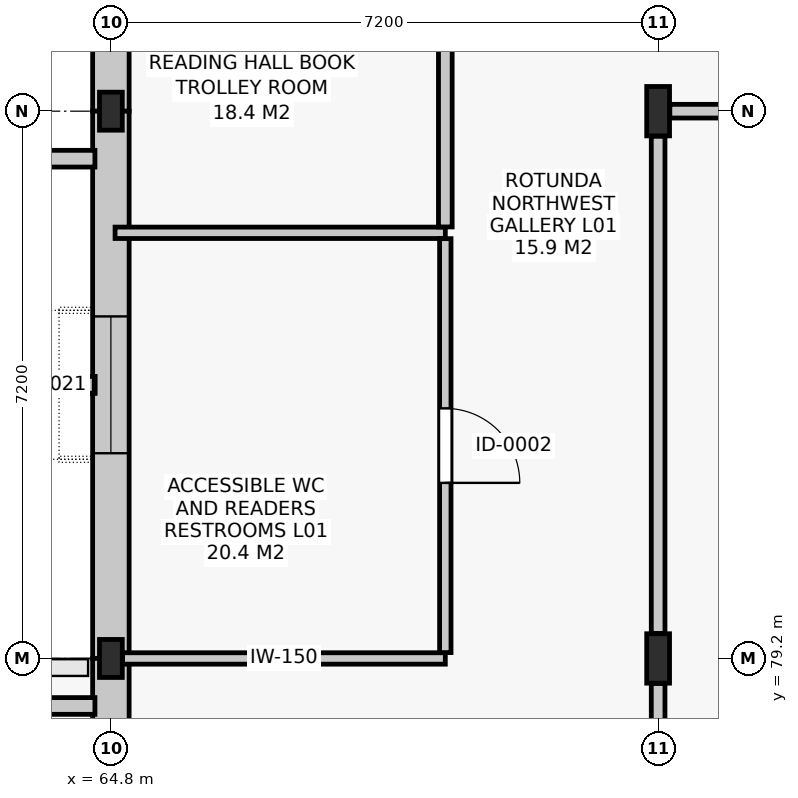
"""IFC4 building model, lengths in metres.
Left out: names, types, materials, properties, quantities, classifications, styles, units other than length and angle.
Written with IfcOpenShell. Run it as: python <this file> out.ifc"""

import sys

from ifc_helpers import new_model, si_unit, direction, frame, frame_2d, origin, origin_2d, place, context, subcontext, project, spatial, rectangle, i_section, extrude, element, fill, save


model = new_model("IFC4")
c1 = context("Model", 3, precision=1e-05, world=origin(), true_north=direction((0.0, 1.0)))
c2 = subcontext(c1, "Body", "Model", "MODEL_VIEW")
j1 = project(units=[si_unit("LENGTHUNIT", "METRE"), si_unit("PLANEANGLEUNIT", "RADIAN")], contexts=[c1])
p1 = place(None, origin())
s1 = spatial("IfcSite", under=j1, at=p1, CompositionType="ELEMENT")
p2 = place(p1, origin())
s2 = spatial("IfcBuilding", under=s1, at=p2, CompositionType="ELEMENT")
p3 = place(p2, frame((0.0, 0.0, 5.4)))
s3 = spatial("IfcBuildingStorey", under=s2, at=p3, CompositionType="ELEMENT", Elevation=5.4)
for number, where, z_axis, x_axis in (
    (1, (64.8, 79.2, 0.0), (0.0, 0.0, 1.0), (1.0, 0.0, 0.0)),
    (2, (64.8, 86.4, 0.0), (0.0, 0.0, 1.0), (1.0, 0.0, 0.0)),
):
    element("IfcColumn", number, at=place(p3, frame(where, z_axis=z_axis, x_axis=x_axis)), inside=s3, PredefinedType="COLUMN", context=c2, shape_type="SweptSolid", body=[
        extrude(i_section(OverallWidth=0.3, OverallDepth=0.5, WebThickness=0.014, FlangeThickness=0.028, FilletRadius=0.027, at=origin_2d()), origin(), (0.0, 0.0, 1.0), 4.8),
    ])
for number, where, z_axis, x_axis in (
    (3, (72.0, 79.2, 0.0), (0.0, 0.0, 1.0), (1.0, 0.0, 0.0)),
    (4, (72.0, 86.4, 0.0), (0.0, 0.0, 1.0), (1.0, 0.0, 0.0)),
):
    element("IfcColumn", number, at=place(p3, frame(where, z_axis=z_axis, x_axis=x_axis)), inside=s3, PredefinedType="COLUMN", context=c2, shape_type="SweptSolid", body=[
        extrude(i_section(OverallWidth=0.3, OverallDepth=0.65, WebThickness=0.016, FlangeThickness=0.031, FilletRadius=0.027, at=origin_2d()), origin(), (0.0, 0.0, 1.0), 4.8),
    ])
p4 = place(p3, frame((64.8, 93.346, 0.0), z_axis=(0.0, 0.0, 1.0), x_axis=(0.0, -1.0, 0.0)))
e5 = element("IfcWall", 5, at=p4, inside=s3, PredefinedType="SOLIDWALL", context=c2, shape_type="SweptSolid", body=[
    extrude(rectangle(XDim=6.946, YDim=0.48, at=frame_2d((3.473, 0.0))), origin(), (0.0, 0.0, 1.0), 3.8),
])
p5 = place(p3, frame((64.8, 86.4, 0.0), z_axis=(0.0, 0.0, 1.0), x_axis=(0.0, -1.0, 0.0)))
e6 = element("IfcWall", 6, at=p5, inside=s3, PredefinedType="SOLIDWALL", context=c2, shape_type="SweptSolid", body=[
    extrude(rectangle(XDim=7.2, YDim=0.48, at=frame_2d((3.6, 0.0))), origin(), (0.0, 0.0, 1.0), 3.8),
])
p6 = place(p5, frame((2.7, 0.0, 0.9)))
e7 = element("IfcOpeningElement", 7, at=p6, cuts=e6, PredefinedType="OPENING", context=c2, shape_type="SweptSolid", body=[
    extrude(rectangle(XDim=1.8, YDim=2.45, at=frame_2d((0.9, 1.225))), frame((0.0, 0.252, 0.0), z_axis=(0.0, -1.0, 0.0), x_axis=(1.0, 0.0, 0.0)), (0.0, 0.0, 1.0), 0.504),
])
p7 = place(p3, frame((64.8, 79.2, 0.0), z_axis=(0.0, 0.0, 1.0), x_axis=(0.0, -1.0, 0.0)))
e8 = element("IfcWall", 8, at=p7, inside=s3, PredefinedType="SOLIDWALL", context=c2, shape_type="SweptSolid", body=[
    extrude(rectangle(XDim=7.2, YDim=0.48, at=frame_2d((3.6, 0.0))), origin(), (0.0, 0.0, 1.0), 3.8),
])
p8 = place(p7, frame((2.7, 0.0, 0.0)))
e9 = element("IfcOpeningElement", 9, at=p8, cuts=e8, PredefinedType="OPENING", context=c2, shape_type="SweptSolid", body=[
    extrude(rectangle(XDim=1.8, YDim=2.3, at=frame_2d((0.9, 1.15))), frame((0.0, 0.252, 0.0), z_axis=(0.0, -1.0, 0.0), x_axis=(1.0, 0.0, 0.0)), (0.0, 0.0, 1.0), 0.504),
])
p9 = place(p3, frame((64.954, 79.2, 0.0), z_axis=(0.0, 0.0, 1.0), x_axis=(1.0, 0.0, 0.0)))
e10 = element("IfcWall", 10, at=p9, inside=s3, PredefinedType="PARTITIONING", context=c2, shape_type="SweptSolid", body=[
    extrude(rectangle(XDim=4.246, YDim=0.15, at=frame_2d((2.123, 0.0))), origin(), (0.0, 0.0, 1.0), 4.055),
])
p10 = place(p3, frame((64.855, 84.8, 0.0), z_axis=(0.0, 0.0, 1.0), x_axis=(1.0, 0.0, 0.0)))
e11 = element("IfcWall", 11, at=p10, inside=s3, PredefinedType="PARTITIONING", context=c2, shape_type="SweptSolid", body=[
    extrude(rectangle(XDim=4.345, YDim=0.15, at=frame_2d((2.172, 0.0))), origin(), (0.0, 0.0, 1.0), 3.955),
])
p11 = place(p3, frame((72.154, 86.4, 0.0), z_axis=(0.0, 0.0, 1.0), x_axis=(1.0, 0.0, 0.0)))
e12 = element("IfcWall", 12, at=p11, inside=s3, PredefinedType="PARTITIONING", context=c2, shape_type="SweptSolid", body=[
    extrude(rectangle(XDim=6.892, YDim=0.18, at=frame_2d((3.446, 0.0))), origin(), (0.0, 0.0, 1.0), 4.505),
])
p12 = place(p11, frame((2.546, 0.0, 0.0)))
e13 = element("IfcOpeningElement", 13, at=p12, cuts=e12, PredefinedType="OPENING", context=c2, shape_type="SweptSolid", body=[
    extrude(rectangle(XDim=1.8, YDim=2.35, at=frame_2d((0.9, 1.175))), frame((0.0, 0.102, 0.0), z_axis=(0.0, -1.0, 0.0), x_axis=(1.0, 0.0, 0.0)), (0.0, 0.0, 1.0), 0.204),
])
p13 = place(p3, frame((69.2, 79.277, 0.0), z_axis=(0.0, 0.0, 1.0), x_axis=(0.0, 1.0, 0.0)))
e14 = element("IfcWall", 14, at=p13, inside=s3, PredefinedType="PARTITIONING", context=c2, shape_type="SweptSolid", body=[
    extrude(rectangle(XDim=5.446, YDim=0.15, at=frame_2d((2.723, 0.0))), origin(), (0.0, 0.0, 1.0), 4.055),
])
p14 = place(p13, frame((2.233, 0.0, 0.0)))
e15 = element("IfcOpeningElement", 15, at=p14, cuts=e14, PredefinedType="OPENING", context=c2, shape_type="SweptSolid", body=[
    extrude(rectangle(XDim=0.98, YDim=2.1, at=frame_2d((0.49, 1.05))), frame((0.0, 0.087, 0.0), z_axis=(0.0, -1.0, 0.0), x_axis=(1.0, 0.0, 0.0)), (0.0, 0.0, 1.0), 0.174),
])
for number, where, z_axis, x_axis in (
    (16, (72.0, 72.329, 0.0), (0.0, 0.0, 1.0), (0.0, 1.0, 0.0)),
    (17, (72.0, 79.529, 0.0), (0.0, 0.0, 1.0), (0.0, 1.0, 0.0)),
):
    element("IfcWall", number, at=place(p3, frame(where, z_axis=z_axis, x_axis=x_axis)), inside=s3, PredefinedType="PARTITIONING", context=c2, shape_type="SweptSolid", body=[
        extrude(rectangle(XDim=6.542, YDim=0.18, at=frame_2d((3.271, 0.0))), origin(), (0.0, 0.0, 1.0), 4.505),
    ])
p15 = place(p3, frame((69.2, 84.877, 0.0), z_axis=(0.0, 0.0, 1.0), x_axis=(0.0, 1.0, 0.0)))
e18 = element("IfcWall", 18, at=p15, inside=s3, PredefinedType="PARTITIONING", context=c2, shape_type="SweptSolid", body=[
    extrude(rectangle(XDim=4.931, YDim=0.18, at=frame_2d((2.466, 0.0))), origin(), (0.0, 0.0, 1.0), 4.055),
])
p16 = place(p15, frame((2.607, 0.0, 0.0)))
e19 = element("IfcOpeningElement", 19, at=p16, cuts=e18, PredefinedType="OPENING", context=c2, shape_type="SweptSolid", body=[
    extrude(rectangle(XDim=1.0, YDim=2.15, at=frame_2d((0.5, 1.075))), frame((0.0, 0.102, 0.0), z_axis=(0.0, -1.0, 0.0), x_axis=(1.0, 0.0, 0.0)), (0.0, 0.0, 1.0), 0.204),
])
p17 = place(p6, origin())
e20 = element("IfcWindow", 20, at=p17, inside=s3, PartitioningType="SINGLE_PANEL", PredefinedType="WINDOW", context=c2, shape_type="SweptSolid", body=[
    extrude(rectangle(XDim=1.8, YDim=2.45, at=frame_2d((0.9, 1.225))), frame((0.0, 0.03, 0.0), z_axis=(0.0, -1.0, 0.0), x_axis=(1.0, 0.0, 0.0)), (0.0, 0.0, 1.0), 0.06),
])
fill(e7, e20)
p18 = place(p14, frame((0.98, 0.0, 0.0), z_axis=(0.0, 0.0, 1.0), x_axis=(-1.0, 0.0, 0.0)))
e21 = element("IfcDoor", 21, at=p18, inside=s3, OperationType="SINGLE_SWING_RIGHT", PredefinedType="DOOR", context=c2, shape_type="SweptSolid", body=[
    extrude(rectangle(XDim=0.98, YDim=2.1, at=frame_2d((0.49, 1.05))), frame((0.0, 0.025, 0.0), z_axis=(0.0, -1.0, 0.0), x_axis=(1.0, 0.0, 0.0)), (0.0, 0.0, 1.0), 0.05),
])
fill(e15, e21)
save(model, sys.argv[1])
